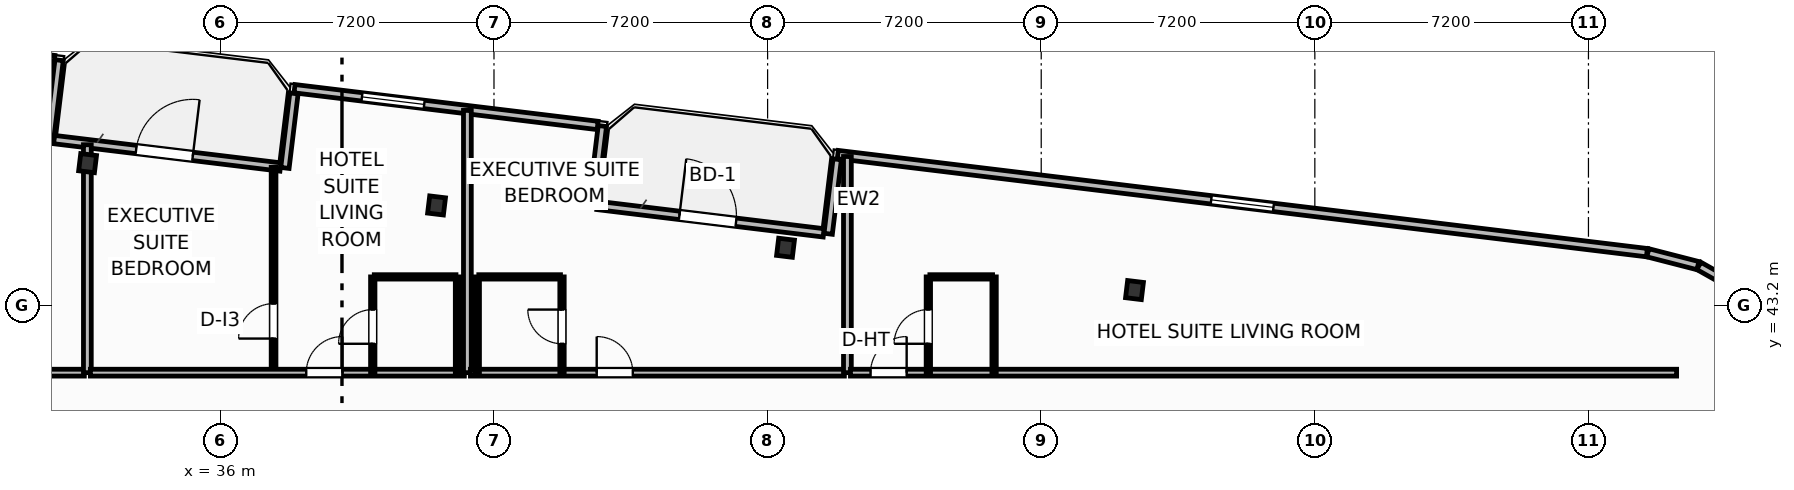
"""IFC4 building model, lengths in metres.
Left out: names, types, materials, properties, quantities, classifications, styles, units other than length and angle.
Written with IfcOpenShell. Run it as: python <this file> out.ifc"""

import sys

from ifc_helpers import new_model, si_unit, direction, frame, frame_2d, origin, origin_2d, place, context, subcontext, project, spatial, rectangle, i_section, extrude, element, fill, save


model = new_model("IFC4")
c1 = context("Model", 3, precision=1e-05, world=origin(), true_north=direction((0.0, 1.0)))
c2 = subcontext(c1, "Body", "Model", "MODEL_VIEW")
j1 = project(units=[si_unit("LENGTHUNIT", "METRE"), si_unit("PLANEANGLEUNIT", "RADIAN")], contexts=[c1])
p1 = place(None, origin())
s1 = spatial("IfcSite", under=j1, at=p1, CompositionType="ELEMENT")
p2 = place(p1, origin())
s2 = spatial("IfcBuilding", under=s1, at=p2, CompositionType="ELEMENT")
p3 = place(p2, frame((0.0, 0.0, 125.4)))
s3 = spatial("IfcBuildingStorey", under=s2, at=p3, CompositionType="ELEMENT", Elevation=125.4)
for number, where, z_axis, x_axis in (
    (1, (60.054, 43.603, 0.0), (0.0, 0.0, 1.0), (0.993, -0.12, 0.0)),
    (2, (50.872, 44.717, 0.0), (0.0, 0.0, 1.0), (0.993, -0.12, 0.0)),
    (3, (41.689, 45.83, 0.0), (0.0, 0.0, 1.0), (0.993, -0.12, 0.0)),
    (4, (32.506, 46.943, 0.0), (0.0, 0.0, 1.0), (0.993, -0.12, 0.0)),
):
    element("IfcColumn", number, at=place(p3, frame(where, z_axis=z_axis, x_axis=x_axis)), inside=s3, PredefinedType="COLUMN", context=c2, shape_type="SweptSolid", body=[
        extrude(i_section(OverallWidth=0.418, OverallDepth=0.455, WebThickness=0.042, FlangeThickness=0.068, FilletRadius=0.025, at=origin_2d()), origin(), (0.0, 0.0, 1.0), 3.7),
    ])
p4 = place(p3, frame((31.624, 47.563, 0.0), z_axis=(0.0, 0.0, 1.0), x_axis=(0.992729951822, -0.120362962556, 0.0)))
e5 = element("IfcWall", 5, at=p4, inside=s3, PredefinedType="SOLIDWALL", context=c2, shape_type="SweptSolid", body=[
    extrude(rectangle(XDim=6.0, YDim=0.22, at=frame_2d((3.0, 0.0))), origin(), (0.0, 0.0, 1.0), 2.73),
])
p5 = place(p4, frame((2.176, 0.0, 0.0)))
e6 = element("IfcOpeningElement", 6, at=p5, cuts=e5, PredefinedType="OPENING", context=c2, shape_type="SweptSolid", body=[
    extrude(rectangle(XDim=1.5, YDim=2.25, at=frame_2d((0.75, 1.125))), frame((0.0, 0.12, 0.0), z_axis=(0.0, -1.0, 0.0), x_axis=(1.0, 0.0, 0.0)), (0.0, 0.0, 1.0), 0.24),
])
p6 = place(p3, frame((45.92, 45.831, 0.0), z_axis=(0.0, 0.0, 1.0), x_axis=(0.992729951822, -0.120362962556, 0.0)))
e7 = element("IfcWall", 7, at=p6, inside=s3, PredefinedType="SOLIDWALL", context=c2, shape_type="SweptSolid", body=[
    extrude(rectangle(XDim=6.0, YDim=0.22, at=frame_2d((3.0, 0.0))), origin(), (0.0, 0.0, 1.0), 2.73),
])
p7 = place(p6, frame((2.176, 0.0, 0.0)))
e8 = element("IfcOpeningElement", 8, at=p7, cuts=e7, PredefinedType="OPENING", context=c2, shape_type="SweptSolid", body=[
    extrude(rectangle(XDim=1.5, YDim=2.25, at=frame_2d((0.75, 1.125))), frame((0.0, 0.12, 0.0), z_axis=(0.0, -1.0, 0.0), x_axis=(1.0, 0.0, 0.0)), (0.0, 0.0, 1.0), 0.24),
])
p8 = place(p3, frame((76.084, 43.575, 0.0), z_axis=(0.0, 0.0, 1.0), x_axis=(-0.871093268227, 0.491117621399, 0.0)))
e9 = element("IfcWall", 9, at=p8, inside=s3, PredefinedType="SOLIDWALL", context=c2, shape_type="SweptSolid", body=[
    extrude(rectangle(XDim=1.353, YDim=0.22, at=frame_2d((0.677, 0.0))), origin(), (0.0, 0.0, 1.0), 2.73),
])
p9 = place(p3, frame((74.881, 44.246, 0.0), z_axis=(0.0, 0.0, 1.0), x_axis=(-0.968549775063, 0.248819881091, 0.0)))
e10 = element("IfcWall", 10, at=p9, inside=s3, PredefinedType="SOLIDWALL", context=c2, shape_type="SweptSolid", body=[
    extrude(rectangle(XDim=1.361, YDim=0.22, at=frame_2d((0.68, 0.0))), origin(), (0.0, 0.0, 1.0), 2.73),
])
p10 = place(p3, frame((73.538, 44.588, 0.0), z_axis=(0.0, 0.0, 1.0), x_axis=(-0.992733493583, 0.120333747213, 0.0)))
e11 = element("IfcWall", 11, at=p10, inside=s3, PredefinedType="SOLIDWALL", context=c2, shape_type="SweptSolid", body=[
    extrude(rectangle(XDim=21.447, YDim=0.22, at=frame_2d((10.724, 0.0))), origin(), (0.0, 0.0, 1.0), 2.73),
])
p11 = place(p10, frame((9.899, 0.0, 0.8)))
e12 = element("IfcOpeningElement", 12, at=p11, cuts=e11, PredefinedType="OPENING", context=c2, shape_type="SweptSolid", body=[
    extrude(rectangle(XDim=1.65, YDim=1.65, at=frame_2d((0.825, 0.825))), frame((0.0, 0.12, 0.0), z_axis=(0.0, -1.0, 0.0), x_axis=(1.0, 0.0, 0.0)), (0.0, 0.0, 1.0), 0.24),
])
p12 = place(p3, frame((52.231, 47.045, 0.0), z_axis=(0.0, 0.0, 1.0), x_axis=(-0.120275992932, -0.992740492538, 0.0)))
e13 = element("IfcWall", 13, at=p12, inside=s3, PredefinedType="SOLIDWALL", context=c2, shape_type="SweptSolid", body=[
    extrude(rectangle(XDim=1.975, YDim=0.22, at=frame_2d((0.988, 0.0))), origin(), (0.0, 0.0, 1.0), 2.73),
])
p13 = place(p3, frame((45.799, 45.835, 0.0), z_axis=(0.0, 0.0, 1.0), x_axis=(0.120314009587, 0.992735885871, 0.0)))
e14 = element("IfcWall", 14, at=p13, inside=s3, PredefinedType="SOLIDWALL", context=c2, shape_type="SweptSolid", body=[
    extrude(rectangle(XDim=2.1, YDim=0.22, at=frame_2d((1.05, 0.0))), origin(), (0.0, 0.0, 1.0), 2.73),
])
p14 = place(p3, frame((45.928, 47.935, 0.0), z_axis=(0.0, 0.0, 1.0), x_axis=(-0.992730591876, 0.120357683402, 0.0)))
e15 = element("IfcWall", 15, at=p14, inside=s3, PredefinedType="SOLIDWALL", context=c2, shape_type="SweptSolid", body=[
    extrude(rectangle(XDim=8.035, YDim=0.22, at=frame_2d((4.017, 0.0))), origin(), (0.0, 0.0, 1.0), 2.73),
])
p15 = place(p14, frame((4.597, 0.0, 0.8)))
e16 = element("IfcOpeningElement", 16, at=p15, cuts=e15, PredefinedType="OPENING", context=c2, shape_type="SweptSolid", body=[
    extrude(rectangle(XDim=1.65, YDim=1.65, at=frame_2d((0.825, 0.825))), frame((0.0, 0.12, 0.0), z_axis=(0.0, -1.0, 0.0), x_axis=(1.0, 0.0, 0.0)), (0.0, 0.0, 1.0), 0.24),
])
p16 = place(p3, frame((37.936, 48.778, 0.0), z_axis=(0.0, 0.0, 1.0), x_axis=(-0.120397815541, -0.992725725472, 0.0)))
e17 = element("IfcWall", 17, at=p16, inside=s3, PredefinedType="SOLIDWALL", context=c2, shape_type="SweptSolid", body=[
    extrude(rectangle(XDim=1.975, YDim=0.22, at=frame_2d((0.988, 0.0))), origin(), (0.0, 0.0, 1.0), 2.73),
])
p17 = place(p3, frame((31.504, 47.568, 0.0), z_axis=(0.0, 0.0, 1.0), x_axis=(0.120341784665, 0.992732519294, 0.0)))
e18 = element("IfcWall", 18, at=p17, inside=s3, PredefinedType="SOLIDWALL", context=c2, shape_type="SweptSolid", body=[
    extrude(rectangle(XDim=2.1, YDim=0.22, at=frame_2d((1.05, 0.0))), origin(), (0.0, 0.0, 1.0), 2.73),
])
p18 = place(p3, frame((31.633, 49.668, 0.0), z_axis=(0.0, 0.0, 1.0), x_axis=(-0.992731670483, 0.120348786531, 0.0)))
e19 = element("IfcWall", 19, at=p18, inside=s3, PredefinedType="SOLIDWALL", context=c2, shape_type="SweptSolid", body=[
    extrude(rectangle(XDim=21.347, YDim=0.22, at=frame_2d((10.674, 0.0))), origin(), (0.0, 0.0, 1.0), 2.73),
])
p19 = place(p18, frame((9.849, 0.0, 0.8)))
e20 = element("IfcOpeningElement", 20, at=p19, cuts=e19, PredefinedType="OPENING", context=c2, shape_type="SweptSolid", body=[
    extrude(rectangle(XDim=1.65, YDim=1.65, at=frame_2d((0.825, 0.825))), frame((0.0, 0.12, 0.0), z_axis=(0.0, -1.0, 0.0), x_axis=(1.0, 0.0, 0.0)), (0.0, 0.0, 1.0), 0.24),
])
p20 = place(p3, frame((3.864, 41.43, 0.0), z_axis=(0.0, 0.0, 1.0), x_axis=(1.0, 0.0, 0.0)))
e21 = element("IfcWall", 21, at=p20, inside=s3, PredefinedType="PARTITIONING", context=c2, shape_type="SweptSolid", body=[
    extrude(rectangle(XDim=28.556, YDim=0.18, at=frame_2d((14.278, 0.0))), origin(), (0.0, 0.0, 1.0), 3.45),
])
p21 = place(p20, frame((21.409, 0.0, 0.0)))
e22 = element("IfcOpeningElement", 22, at=p21, cuts=e21, PredefinedType="OPENING", context=c2, shape_type="SweptSolid", body=[
    extrude(rectangle(XDim=0.95, YDim=2.15, at=frame_2d((0.475, 1.075))), frame((0.0, 0.1, 0.0), z_axis=(0.0, -1.0, 0.0), x_axis=(1.0, 0.0, 0.0)), (0.0, 0.0, 1.0), 0.2),
])
p22 = place(p3, frame((32.5, 41.43, 0.0), z_axis=(0.0, 0.0, 1.0), x_axis=(0.0, 1.0, 0.0)))
e23 = element("IfcWall", 23, at=p22, inside=s3, PredefinedType="PARTITIONING", context=c2, shape_type="SweptSolid", body=[
    extrude(rectangle(XDim=5.997, YDim=0.205, at=frame_2d((2.999, 0.0))), origin(), (0.0, 0.0, 1.0), 2.662),
])
p23 = place(p3, frame((37.4, 41.43, 0.0), z_axis=(0.0, 0.0, 1.0), x_axis=(0.0, 1.0, 0.0)))
e24 = element("IfcWall", 24, at=p23, inside=s3, PredefinedType="PARTITIONING", context=c2, shape_type="SweptSolid", body=[
    extrude(rectangle(XDim=5.403, YDim=0.125, at=frame_2d((2.702, 0.0))), origin(), (0.0, 0.0, 1.0), 3.45),
])
p24 = place(p23, frame((0.897, 0.0, 0.0)))
e25 = element("IfcOpeningElement", 25, at=p24, cuts=e24, PredefinedType="OPENING", context=c2, shape_type="SweptSolid", body=[
    extrude(rectangle(XDim=0.92, YDim=2.05, at=frame_2d((0.46, 1.025))), frame((0.0, 0.073, 0.0), z_axis=(0.0, -1.0, 0.0), x_axis=(1.0, 0.0, 0.0)), (0.0, 0.0, 1.0), 0.145),
])
p25 = place(p3, frame((32.58, 41.43, 0.0), z_axis=(0.0, 0.0, 1.0), x_axis=(1.0, 0.0, 0.0)))
e26 = element("IfcWall", 26, at=p25, inside=s3, PredefinedType="PARTITIONING", context=c2, shape_type="SweptSolid", body=[
    extrude(rectangle(XDim=9.84, YDim=0.18, at=frame_2d((4.92, 0.0))), origin(), (0.0, 0.0, 1.0), 3.45),
])
p26 = place(p25, frame((5.68, 0.0, 0.0)))
e27 = element("IfcOpeningElement", 27, at=p26, cuts=e26, PredefinedType="OPENING", context=c2, shape_type="SweptSolid", body=[
    extrude(rectangle(XDim=0.95, YDim=2.15, at=frame_2d((0.475, 1.075))), frame((0.0, 0.1, 0.0), z_axis=(0.0, -1.0, 0.0), x_axis=(1.0, 0.0, 0.0)), (0.0, 0.0, 1.0), 0.2),
])
p27 = place(p3, frame((40.05, 43.95, 0.0), z_axis=(0.0, 0.0, 1.0), x_axis=(1.0, 0.0, 0.0)))
e28 = element("IfcWall", 28, at=p27, inside=s3, PredefinedType="PARTITIONING", context=c2, shape_type="SweptSolid", body=[
    extrude(rectangle(XDim=2.15, YDim=0.115, at=frame_2d((1.075, 0.0))), origin(), (0.0, 0.0, 1.0), 3.45),
])
p28 = place(p3, frame((40.01, 41.43, 0.0), z_axis=(0.0, 0.0, 1.0), x_axis=(0.0, 1.0, 0.0)))
e29 = element("IfcWall", 29, at=p28, inside=s3, PredefinedType="PARTITIONING", context=c2, shape_type="SweptSolid", body=[
    extrude(rectangle(XDim=2.52, YDim=0.115, at=frame_2d((1.26, 0.0))), origin(), (0.0, 0.0, 1.0), 3.45),
])
p29 = place(p28, frame((0.76, 0.0, 0.0)))
e30 = element("IfcOpeningElement", 30, at=p29, cuts=e29, PredefinedType="OPENING", context=c2, shape_type="SweptSolid", body=[
    extrude(rectangle(XDim=0.9, YDim=2.05, at=frame_2d((0.45, 1.025))), frame((0.0, 0.067, 0.0), z_axis=(0.0, -1.0, 0.0), x_axis=(1.0, 0.0, 0.0)), (0.0, 0.0, 1.0), 0.135),
])
p30 = place(p3, frame((42.24, 41.43, 0.0), z_axis=(0.0, 0.0, 1.0), x_axis=(0.0, 1.0, 0.0)))
e31 = element("IfcWall", 31, at=p30, inside=s3, PredefinedType="PARTITIONING", context=c2, shape_type="SweptSolid", body=[
    extrude(rectangle(XDim=2.52, YDim=0.115, at=frame_2d((1.26, 0.0))), origin(), (0.0, 0.0, 1.0), 2.662),
])
p31 = place(p3, frame((42.5, 41.43, 0.0), z_axis=(0.0, 0.0, 1.0), x_axis=(0.0, 1.0, 0.0)))
e32 = element("IfcWall", 32, at=p31, inside=s3, PredefinedType="PARTITIONING", context=c2, shape_type="SweptSolid", body=[
    extrude(rectangle(XDim=6.9, YDim=0.205, at=frame_2d((3.45, 0.0))), origin(), (0.0, 0.0, 1.0), 2.662),
])
p32 = place(p3, frame((42.58, 41.43, 0.0), z_axis=(0.0, 0.0, 1.0), x_axis=(1.0, 0.0, 0.0)))
e33 = element("IfcWall", 33, at=p32, inside=s3, PredefinedType="PARTITIONING", context=c2, shape_type="SweptSolid", body=[
    extrude(rectangle(XDim=9.84, YDim=0.18, at=frame_2d((4.92, 0.0))), origin(), (0.0, 0.0, 1.0), 3.45),
])
p33 = place(p32, frame((3.323, 0.0, 0.0)))
e34 = element("IfcOpeningElement", 34, at=p33, cuts=e33, PredefinedType="OPENING", context=c2, shape_type="SweptSolid", body=[
    extrude(rectangle(XDim=0.95, YDim=2.15, at=frame_2d((0.475, 1.075))), frame((0.0, 0.1, 0.0), z_axis=(0.0, -1.0, 0.0), x_axis=(1.0, 0.0, 0.0)), (0.0, 0.0, 1.0), 0.2),
])
p34 = place(p3, frame((42.8, 43.95, 0.0), z_axis=(0.0, 0.0, 1.0), x_axis=(1.0, 0.0, 0.0)))
e35 = element("IfcWall", 35, at=p34, inside=s3, PredefinedType="PARTITIONING", context=c2, shape_type="SweptSolid", body=[
    extrude(rectangle(XDim=2.15, YDim=0.115, at=frame_2d((1.075, 0.0))), origin(), (0.0, 0.0, 1.0), 3.45),
])
p35 = place(p3, frame((44.99, 41.43, 0.0), z_axis=(0.0, 0.0, 1.0), x_axis=(0.0, 1.0, 0.0)))
e36 = element("IfcWall", 36, at=p35, inside=s3, PredefinedType="PARTITIONING", context=c2, shape_type="SweptSolid", body=[
    extrude(rectangle(XDim=2.52, YDim=0.115, at=frame_2d((1.26, 0.0))), origin(), (0.0, 0.0, 1.0), 3.45),
])
p36 = place(p35, frame((0.76, 0.0, 0.0)))
e37 = element("IfcOpeningElement", 37, at=p36, cuts=e36, PredefinedType="OPENING", context=c2, shape_type="SweptSolid", body=[
    extrude(rectangle(XDim=0.9, YDim=2.05, at=frame_2d((0.45, 1.025))), frame((0.0, 0.067, 0.0), z_axis=(0.0, -1.0, 0.0), x_axis=(1.0, 0.0, 0.0)), (0.0, 0.0, 1.0), 0.135),
])
p37 = place(p3, frame((42.76, 41.43, 0.0), z_axis=(0.0, 0.0, 1.0), x_axis=(0.0, 1.0, 0.0)))
e38 = element("IfcWall", 38, at=p37, inside=s3, PredefinedType="PARTITIONING", context=c2, shape_type="SweptSolid", body=[
    extrude(rectangle(XDim=2.52, YDim=0.115, at=frame_2d((1.26, 0.0))), origin(), (0.0, 0.0, 1.0), 2.662),
])
p38 = place(p3, frame((52.5, 41.43, 0.0), z_axis=(0.0, 0.0, 1.0), x_axis=(0.0, 1.0, 0.0)))
e39 = element("IfcWall", 39, at=p38, inside=s3, PredefinedType="PARTITIONING", context=c2, shape_type="SweptSolid", body=[
    extrude(rectangle(XDim=5.688, YDim=0.205, at=frame_2d((2.844, 0.0))), origin(), (0.0, 0.0, 1.0), 3.45),
])
p39 = place(p3, frame((52.58, 41.43, 0.0), z_axis=(0.0, 0.0, 1.0), x_axis=(1.0, 0.0, 0.0)))
e40 = element("IfcWall", 40, at=p39, inside=s3, PredefinedType="PARTITIONING", context=c2, shape_type="SweptSolid", body=[
    extrude(rectangle(XDim=21.74, YDim=0.18, at=frame_2d((10.87, 0.0))), origin(), (0.0, 0.0, 1.0), 3.45),
])
p40 = place(p39, frame((0.529, 0.0, 0.0)))
e41 = element("IfcOpeningElement", 41, at=p40, cuts=e40, PredefinedType="OPENING", context=c2, shape_type="SweptSolid", body=[
    extrude(rectangle(XDim=0.95, YDim=2.15, at=frame_2d((0.475, 1.075))), frame((0.0, 0.1, 0.0), z_axis=(0.0, -1.0, 0.0), x_axis=(1.0, 0.0, 0.0)), (0.0, 0.0, 1.0), 0.2),
])
p41 = place(p3, frame((54.67, 43.95, 0.0), z_axis=(0.0, 0.0, 1.0), x_axis=(1.0, 0.0, 0.0)))
e42 = element("IfcWall", 42, at=p41, inside=s3, PredefinedType="PARTITIONING", context=c2, shape_type="SweptSolid", body=[
    extrude(rectangle(XDim=1.65, YDim=0.115, at=frame_2d((0.825, 0.0))), origin(), (0.0, 0.0, 1.0), 2.824),
])
p42 = place(p3, frame((54.63, 41.43, 0.0), z_axis=(0.0, 0.0, 1.0), x_axis=(0.0, 1.0, 0.0)))
e43 = element("IfcWall", 43, at=p42, inside=s3, PredefinedType="PARTITIONING", context=c2, shape_type="SweptSolid", body=[
    extrude(rectangle(XDim=2.52, YDim=0.115, at=frame_2d((1.26, 0.0))), origin(), (0.0, 0.0, 1.0), 3.45),
])
p43 = place(p42, frame((0.76, 0.0, 0.0)))
e44 = element("IfcOpeningElement", 44, at=p43, cuts=e43, PredefinedType="OPENING", context=c2, shape_type="SweptSolid", body=[
    extrude(rectangle(XDim=0.9, YDim=2.05, at=frame_2d((0.45, 1.025))), frame((0.0, 0.067, 0.0), z_axis=(0.0, -1.0, 0.0), x_axis=(1.0, 0.0, 0.0)), (0.0, 0.0, 1.0), 0.135),
])
p44 = place(p3, frame((56.36, 41.43, 0.0), z_axis=(0.0, 0.0, 1.0), x_axis=(0.0, 1.0, 0.0)))
e45 = element("IfcWall", 45, at=p44, inside=s3, PredefinedType="PARTITIONING", context=c2, shape_type="SweptSolid", body=[
    extrude(rectangle(XDim=2.52, YDim=0.115, at=frame_2d((1.26, 0.0))), origin(), (0.0, 0.0, 1.0), 3.45),
])
p45 = place(p5, origin())
e46 = element("IfcDoor", 46, at=p45, inside=s3, OperationType="SINGLE_SWING_RIGHT", PredefinedType="DOOR", context=c2, shape_type="SweptSolid", body=[
    extrude(rectangle(XDim=1.5, YDim=2.25, at=frame_2d((0.75, 1.125))), frame((0.0, 0.025, 0.0), z_axis=(0.0, -1.0, 0.0), x_axis=(1.0, 0.0, 0.0)), (0.0, 0.0, 1.0), 0.05),
])
fill(e6, e46)
p46 = place(p7, origin())
e47 = element("IfcDoor", 47, at=p46, inside=s3, OperationType="SINGLE_SWING_LEFT", PredefinedType="DOOR", context=c2, shape_type="SweptSolid", body=[
    extrude(rectangle(XDim=1.5, YDim=2.25, at=frame_2d((0.75, 1.125))), frame((0.0, 0.025, 0.0), z_axis=(0.0, -1.0, 0.0), x_axis=(1.0, 0.0, 0.0)), (0.0, 0.0, 1.0), 0.05),
])
fill(e8, e47)
p47 = place(p11, origin())
e48 = element("IfcWindow", 48, at=p47, inside=s3, PartitioningType="SINGLE_PANEL", PredefinedType="WINDOW", context=c2, shape_type="SweptSolid", body=[
    extrude(rectangle(XDim=1.65, YDim=1.65, at=frame_2d((0.825, 0.825))), frame((0.0, 0.03, 0.0), z_axis=(0.0, -1.0, 0.0), x_axis=(1.0, 0.0, 0.0)), (0.0, 0.0, 1.0), 0.06),
])
fill(e12, e48)
p48 = place(p15, origin())
e49 = element("IfcWindow", 49, at=p48, inside=s3, PartitioningType="SINGLE_PANEL", PredefinedType="WINDOW", context=c2, shape_type="SweptSolid", body=[
    extrude(rectangle(XDim=1.65, YDim=1.65, at=frame_2d((0.825, 0.825))), frame((0.0, 0.03, 0.0), z_axis=(0.0, -1.0, 0.0), x_axis=(1.0, 0.0, 0.0)), (0.0, 0.0, 1.0), 0.06),
])
fill(e16, e49)
p49 = place(p24, origin())
e50 = element("IfcDoor", 50, at=p49, inside=s3, OperationType="SINGLE_SWING_LEFT", PredefinedType="DOOR", context=c2, shape_type="SweptSolid", body=[
    extrude(rectangle(XDim=0.92, YDim=2.05, at=frame_2d((0.46, 1.025))), frame((0.0, 0.025, 0.0), z_axis=(0.0, -1.0, 0.0), x_axis=(1.0, 0.0, 0.0)), (0.0, 0.0, 1.0), 0.05),
])
fill(e25, e50)
p50 = place(p26, origin())
e51 = element("IfcDoor", 51, at=p50, inside=s3, OperationType="SINGLE_SWING_RIGHT", PredefinedType="DOOR", context=c2, shape_type="SweptSolid", body=[
    extrude(rectangle(XDim=0.95, YDim=2.15, at=frame_2d((0.475, 1.075))), frame((0.0, 0.025, 0.0), z_axis=(0.0, -1.0, 0.0), x_axis=(1.0, 0.0, 0.0)), (0.0, 0.0, 1.0), 0.05),
])
fill(e27, e51)
p51 = place(p29, origin())
e52 = element("IfcDoor", 52, at=p51, inside=s3, OperationType="SINGLE_SWING_LEFT", PredefinedType="DOOR", context=c2, shape_type="SweptSolid", body=[
    extrude(rectangle(XDim=0.9, YDim=2.05, at=frame_2d((0.45, 1.025))), frame((0.0, 0.025, 0.0), z_axis=(0.0, -1.0, 0.0), x_axis=(1.0, 0.0, 0.0)), (0.0, 0.0, 1.0), 0.05),
])
fill(e30, e52)
p52 = place(p33, origin())
e53 = element("IfcDoor", 53, at=p52, inside=s3, OperationType="SINGLE_SWING_LEFT", PredefinedType="DOOR", context=c2, shape_type="SweptSolid", body=[
    extrude(rectangle(XDim=0.95, YDim=2.15, at=frame_2d((0.475, 1.075))), frame((0.0, 0.025, 0.0), z_axis=(0.0, -1.0, 0.0), x_axis=(1.0, 0.0, 0.0)), (0.0, 0.0, 1.0), 0.05),
])
fill(e34, e53)
p53 = place(p36, origin())
e54 = element("IfcDoor", 54, at=p53, inside=s3, OperationType="SINGLE_SWING_RIGHT", PredefinedType="DOOR", context=c2, shape_type="SweptSolid", body=[
    extrude(rectangle(XDim=0.9, YDim=2.05, at=frame_2d((0.45, 1.025))), frame((0.0, 0.025, 0.0), z_axis=(0.0, -1.0, 0.0), x_axis=(1.0, 0.0, 0.0)), (0.0, 0.0, 1.0), 0.05),
])
fill(e37, e54)
p54 = place(p40, origin())
e55 = element("IfcDoor", 55, at=p54, inside=s3, OperationType="SINGLE_SWING_RIGHT", PredefinedType="DOOR", context=c2, shape_type="SweptSolid", body=[
    extrude(rectangle(XDim=0.95, YDim=2.15, at=frame_2d((0.475, 1.075))), frame((0.0, 0.025, 0.0), z_axis=(0.0, -1.0, 0.0), x_axis=(1.0, 0.0, 0.0)), (0.0, 0.0, 1.0), 0.05),
])
fill(e41, e55)
p55 = place(p43, origin())
e56 = element("IfcDoor", 56, at=p55, inside=s3, OperationType="SINGLE_SWING_LEFT", PredefinedType="DOOR", context=c2, shape_type="SweptSolid", body=[
    extrude(rectangle(XDim=0.9, YDim=2.05, at=frame_2d((0.45, 1.025))), frame((0.0, 0.025, 0.0), z_axis=(0.0, -1.0, 0.0), x_axis=(1.0, 0.0, 0.0)), (0.0, 0.0, 1.0), 0.05),
])
fill(e44, e56)
save(model, sys.argv[1])
